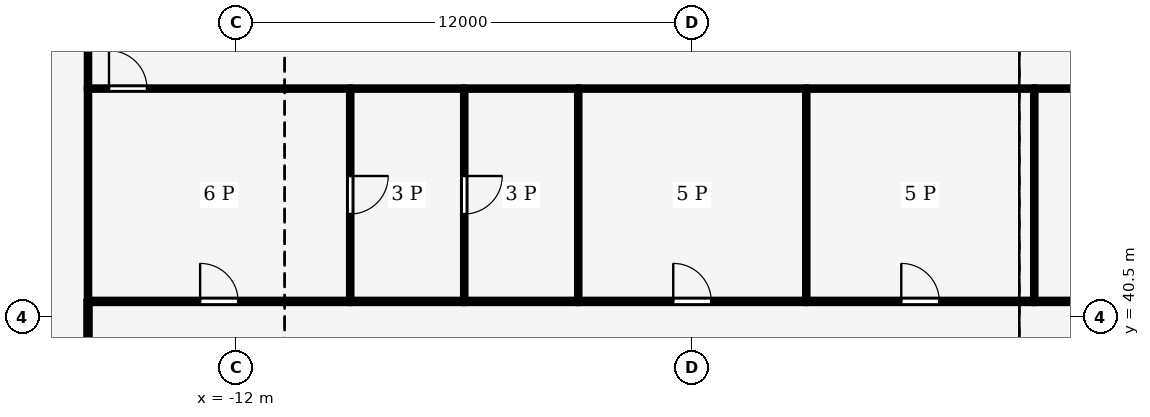
"""IFC4 building model, lengths in metres.
Left out: names, types, materials, properties, quantities, classifications, styles, units other than length and angle.
Written with IfcOpenShell. Run it as: python <this file> out.ifc"""

import sys

from ifc_helpers import new_model, si_unit, direction, frame, frame_2d, origin, place, context, subcontext, project, spatial, rectangle, extrude, element, fill, save


model = new_model("IFC4")
c1 = context("Model", 3, precision=1e-05, world=origin(), true_north=direction((0.0, 1.0)))
c2 = subcontext(c1, "Body", "Model", "MODEL_VIEW")
j1 = project(units=[si_unit("LENGTHUNIT", "METRE"), si_unit("PLANEANGLEUNIT", "RADIAN")], contexts=[c1])
p1 = place(None, origin())
s1 = spatial("IfcSite", under=j1, at=p1, CompositionType="ELEMENT")
p2 = place(p1, origin())
s2 = spatial("IfcBuilding", under=s1, at=p2, CompositionType="ELEMENT")
p3 = place(p2, frame((0.0, 0.0, 202.0)))
s3 = spatial("IfcBuildingStorey", under=s2, at=p3, CompositionType="ELEMENT", Elevation=202.0)
p4 = place(p3, frame((-15.9, 40.9, 0.0), z_axis=(0.0, 0.0, 1.0), x_axis=(1.0, 0.0, 0.0)))
e1 = element("IfcWall", 1, at=p4, inside=s3, PredefinedType="PARTITIONING", context=c2, shape_type="SweptSolid", body=[
    extrude(rectangle(XDim=6.9, YDim=0.125, at=frame_2d((3.45, 0.0))), origin(), (0.0, 0.0, 1.0), 3.44),
])
p5 = place(p4, frame((2.95, 0.0, 0.0)))
e2 = element("IfcOpeningElement", 2, at=p5, cuts=e1, PredefinedType="OPENING", context=c2, shape_type="SweptSolid", body=[
    extrude(rectangle(XDim=1.0, YDim=2.1, at=frame_2d((0.5, 1.05))), frame((0.0, 0.073, 0.0), z_axis=(0.0, -1.0, 0.0), x_axis=(1.0, 0.0, 0.0)), (0.0, 0.0, 1.0), 0.145),
])
for number, where, z_axis, x_axis in (
    (3, (-6.0, 40.9, 0.0), (0.0, 0.0, 1.0), (-1.0, 0.0, 0.0)),
    (4, (-3.0, 40.9, 0.0), (0.0, 0.0, 1.0), (-1.0, 0.0, 0.0)),
):
    element("IfcWall", number, at=place(p3, frame(where, z_axis=z_axis, x_axis=x_axis)), inside=s3, PredefinedType="PARTITIONING", context=c2, shape_type="SweptSolid", body=[
        extrude(rectangle(XDim=3.0, YDim=0.125, at=frame_2d((1.5, 0.0))), origin(), (0.0, 0.0, 1.0), 3.44),
    ])
p6 = place(p3, frame((-3.0, 40.9, 0.0), z_axis=(0.0, 0.0, 1.0), x_axis=(1.0, 0.0, 0.0)))
e5 = element("IfcWall", 5, at=p6, inside=s3, PredefinedType="PARTITIONING", context=c2, shape_type="SweptSolid", body=[
    extrude(rectangle(XDim=6.0, YDim=0.125, at=frame_2d((3.0, 0.0))), origin(), (0.0, 0.0, 1.0), 3.44),
])
p7 = place(p6, frame((2.5, 0.0, 0.0)))
e6 = element("IfcOpeningElement", 6, at=p7, cuts=e5, PredefinedType="OPENING", context=c2, shape_type="SweptSolid", body=[
    extrude(rectangle(XDim=1.0, YDim=2.1, at=frame_2d((0.5, 1.05))), frame((0.0, 0.073, 0.0), z_axis=(0.0, -1.0, 0.0), x_axis=(1.0, 0.0, 0.0)), (0.0, 0.0, 1.0), 0.145),
])
p8 = place(p3, frame((3.0, 40.9, 0.0), z_axis=(0.0, 0.0, 1.0), x_axis=(1.0, 0.0, 0.0)))
e7 = element("IfcWall", 7, at=p8, inside=s3, PredefinedType="PARTITIONING", context=c2, shape_type="SweptSolid", body=[
    extrude(rectangle(XDim=6.0, YDim=0.125, at=frame_2d((3.0, 0.0))), origin(), (0.0, 0.0, 1.0), 3.44),
])
p9 = place(p8, frame((2.5, 0.0, 0.0)))
e8 = element("IfcOpeningElement", 8, at=p9, cuts=e7, PredefinedType="OPENING", context=c2, shape_type="SweptSolid", body=[
    extrude(rectangle(XDim=1.0, YDim=2.1, at=frame_2d((0.5, 1.05))), frame((0.0, 0.073, 0.0), z_axis=(0.0, -1.0, 0.0), x_axis=(1.0, 0.0, 0.0)), (0.0, 0.0, 1.0), 0.145),
])
p10 = place(p3, frame((9.0, 40.9, 0.0), z_axis=(0.0, 0.0, 1.0), x_axis=(1.0, 0.0, 0.0)))
e9 = element("IfcWall", 9, at=p10, inside=s3, PredefinedType="PARTITIONING", context=c2, shape_type="SweptSolid", body=[
    extrude(rectangle(XDim=6.9, YDim=0.125, at=frame_2d((3.45, 0.0))), origin(), (0.0, 0.0, 1.0), 3.44),
])
p11 = place(p10, frame((2.95, 0.0, 0.0)))
e10 = element("IfcOpeningElement", 10, at=p11, cuts=e9, PredefinedType="OPENING", context=c2, shape_type="SweptSolid", body=[
    extrude(rectangle(XDim=1.0, YDim=2.1, at=frame_2d((0.5, 1.05))), frame((0.0, 0.073, 0.0), z_axis=(0.0, -1.0, 0.0), x_axis=(1.0, 0.0, 0.0)), (0.0, 0.0, 1.0), 0.145),
])
p12 = place(p3, frame((-15.9, 34.5, 0.0), z_axis=(0.0, 0.0, 1.0), x_axis=(0.0, 1.0, 0.0)))
e11 = element("IfcWall", 11, at=p12, inside=s3, PredefinedType="PARTITIONING", context=c2, shape_type="SweptSolid", body=[
    extrude(rectangle(XDim=6.404, YDim=0.125, at=frame_2d((3.202, 0.0))), origin(), (0.0, 0.0, 1.0), 3.14),
])
p13 = place(p12, frame((2.702, 0.0, 0.0)))
e12 = element("IfcOpeningElement", 12, at=p13, cuts=e11, PredefinedType="OPENING", context=c2, shape_type="SweptSolid", body=[
    extrude(rectangle(XDim=1.0, YDim=2.1, at=frame_2d((0.5, 1.05))), frame((0.0, 0.073, 0.0), z_axis=(0.0, -1.0, 0.0), x_axis=(1.0, 0.0, 0.0)), (0.0, 0.0, 1.0), 0.145),
])
p14 = place(p3, frame((-9.0, 46.5, 0.0), z_axis=(0.0, 0.0, 1.0), x_axis=(0.0, -1.0, 0.0)))
e13 = element("IfcWall", 13, at=p14, inside=s3, PredefinedType="PARTITIONING", context=c2, shape_type="SweptSolid", body=[
    extrude(rectangle(XDim=5.6, YDim=0.1, at=frame_2d((2.8, 0.0))), origin(), (0.0, 0.0, 1.0), 3.87),
])
p15 = place(p14, frame((2.3, 0.0, 0.0)))
e14 = element("IfcOpeningElement", 14, at=p15, cuts=e13, PredefinedType="OPENING", context=c2, shape_type="SweptSolid", body=[
    extrude(rectangle(XDim=1.0, YDim=2.1, at=frame_2d((0.5, 1.05))), frame((0.0, 0.06, 0.0), z_axis=(0.0, -1.0, 0.0), x_axis=(1.0, 0.0, 0.0)), (0.0, 0.0, 1.0), 0.12),
])
p16 = place(p3, frame((-15.9, 46.5, 0.0), z_axis=(0.0, 0.0, 1.0), x_axis=(1.0, 0.0, 0.0)))
e15 = element("IfcWall", 15, at=p16, inside=s3, PredefinedType="PARTITIONING", context=c2, shape_type="SweptSolid", body=[
    extrude(rectangle(XDim=6.904, YDim=0.1, at=frame_2d((3.452, 0.0))), origin(), (0.0, 0.0, 1.0), 3.44),
])
p17 = place(p16, frame((0.552, 0.0, 0.0)))
e16 = element("IfcOpeningElement", 16, at=p17, cuts=e15, PredefinedType="OPENING", context=c2, shape_type="SweptSolid", body=[
    extrude(rectangle(XDim=1.0, YDim=2.1, at=frame_2d((0.5, 1.05))), frame((0.0, 0.06, 0.0), z_axis=(0.0, -1.0, 0.0), x_axis=(1.0, 0.0, 0.0)), (0.0, 0.0, 1.0), 0.12),
])
p18 = place(p3, frame((-15.9, 46.504, 0.0), z_axis=(0.0, 0.0, 1.0), x_axis=(0.0, -1.0, 0.0)))
e17 = element("IfcWall", 17, at=p18, inside=s3, PredefinedType="PARTITIONING", context=c2, shape_type="SweptSolid", body=[
    extrude(rectangle(XDim=5.608, YDim=0.1, at=frame_2d((2.804, 0.0))), origin(), (0.0, 0.0, 1.0), 3.44),
])
p19 = place(p3, frame((-6.0, 46.5, 0.0), z_axis=(0.0, 0.0, 1.0), x_axis=(0.0, -1.0, 0.0)))
e18 = element("IfcWall", 18, at=p19, inside=s3, PredefinedType="PARTITIONING", context=c2, shape_type="SweptSolid", body=[
    extrude(rectangle(XDim=5.6, YDim=0.1, at=frame_2d((2.8, 0.0))), origin(), (0.0, 0.0, 1.0), 3.87),
])
p20 = place(p19, frame((2.3, 0.0, 0.0)))
e19 = element("IfcOpeningElement", 19, at=p20, cuts=e18, PredefinedType="OPENING", context=c2, shape_type="SweptSolid", body=[
    extrude(rectangle(XDim=1.0, YDim=2.1, at=frame_2d((0.5, 1.05))), frame((0.0, 0.06, 0.0), z_axis=(0.0, -1.0, 0.0), x_axis=(1.0, 0.0, 0.0)), (0.0, 0.0, 1.0), 0.12),
])
p21 = place(p3, frame((-5.996, 46.5, 0.0), z_axis=(0.0, 0.0, 1.0), x_axis=(-1.0, 0.0, 0.0)))
e20 = element("IfcWall", 20, at=p21, inside=s3, PredefinedType="PARTITIONING", context=c2, shape_type="SweptSolid", body=[
    extrude(rectangle(XDim=3.008, YDim=0.1, at=frame_2d((1.504, 0.0))), origin(), (0.0, 0.0, 1.0), 3.44),
])
p22 = place(p3, frame((-3.0, 40.9, 0.0), z_axis=(0.0, 0.0, 1.0), x_axis=(0.0, 1.0, 0.0)))
e21 = element("IfcWall", 21, at=p22, inside=s3, PredefinedType="PARTITIONING", context=c2, shape_type="SweptSolid", body=[
    extrude(rectangle(XDim=5.6, YDim=0.1, at=frame_2d((2.8, 0.0))), origin(), (0.0, 0.0, 1.0), 3.87),
])
p23 = place(p3, frame((-2.996, 46.5, 0.0), z_axis=(0.0, 0.0, 1.0), x_axis=(-1.0, 0.0, 0.0)))
e22 = element("IfcWall", 22, at=p23, inside=s3, PredefinedType="PARTITIONING", context=c2, shape_type="SweptSolid", body=[
    extrude(rectangle(XDim=3.008, YDim=0.1, at=frame_2d((1.504, 0.0))), origin(), (0.0, 0.0, 1.0), 3.44),
])
p24 = place(p3, frame((3.0, 40.9, 0.0), z_axis=(0.0, 0.0, 1.0), x_axis=(0.0, 1.0, 0.0)))
e23 = element("IfcWall", 23, at=p24, inside=s3, PredefinedType="PARTITIONING", context=c2, shape_type="SweptSolid", body=[
    extrude(rectangle(XDim=5.6, YDim=0.1, at=frame_2d((2.8, 0.0))), origin(), (0.0, 0.0, 1.0), 3.87),
])
p25 = place(p3, frame((3.004, 46.5, 0.0), z_axis=(0.0, 0.0, 1.0), x_axis=(-1.0, 0.0, 0.0)))
e24 = element("IfcWall", 24, at=p25, inside=s3, PredefinedType="PARTITIONING", context=c2, shape_type="SweptSolid", body=[
    extrude(rectangle(XDim=6.008, YDim=0.1, at=frame_2d((3.004, 0.0))), origin(), (0.0, 0.0, 1.0), 3.44),
])
p26 = place(p3, frame((9.0, 40.9, 0.0), z_axis=(0.0, 0.0, 1.0), x_axis=(0.0, 1.0, 0.0)))
e25 = element("IfcWall", 25, at=p26, inside=s3, PredefinedType="PARTITIONING", context=c2, shape_type="SweptSolid", body=[
    extrude(rectangle(XDim=5.6, YDim=0.1, at=frame_2d((2.8, 0.0))), origin(), (0.0, 0.0, 1.0), 3.87),
])
p27 = place(p3, frame((9.004, 46.5, 0.0), z_axis=(0.0, 0.0, 1.0), x_axis=(-1.0, 0.0, 0.0)))
e26 = element("IfcWall", 26, at=p27, inside=s3, PredefinedType="PARTITIONING", context=c2, shape_type="SweptSolid", body=[
    extrude(rectangle(XDim=6.008, YDim=0.1, at=frame_2d((3.004, 0.0))), origin(), (0.0, 0.0, 1.0), 3.44),
])
p28 = place(p3, frame((15.9, 46.5, 0.0), z_axis=(0.0, 0.0, 1.0), x_axis=(-1.0, 0.0, 0.0)))
e27 = element("IfcWall", 27, at=p28, inside=s3, PredefinedType="PARTITIONING", context=c2, shape_type="SweptSolid", body=[
    extrude(rectangle(XDim=6.904, YDim=0.1, at=frame_2d((3.452, 0.0))), origin(), (0.0, 0.0, 1.0), 3.44),
])
p29 = place(p3, frame((-15.9, 61.504, 0.0), z_axis=(0.0, 0.0, 1.0), x_axis=(0.0, -1.0, 0.0)))
e28 = element("IfcWall", 28, at=p29, inside=s3, PredefinedType="PARTITIONING", context=c2, shape_type="SweptSolid", body=[
    extrude(rectangle(XDim=15.008, YDim=0.1, at=frame_2d((7.504, 0.0))), origin(), (0.0, 0.0, 1.0), 3.24),
])
p30 = place(p5, origin())
e29 = element("IfcDoor", 29, at=p30, inside=s3, OperationType="SINGLE_SWING_LEFT", PredefinedType="DOOR", context=c2, shape_type="SweptSolid", body=[
    extrude(rectangle(XDim=1.0, YDim=2.1, at=frame_2d((0.5, 1.05))), frame((0.0, 0.025, 0.0), z_axis=(0.0, -1.0, 0.0), x_axis=(1.0, 0.0, 0.0)), (0.0, 0.0, 1.0), 0.05),
])
fill(e2, e29)
p31 = place(p7, origin())
e30 = element("IfcDoor", 30, at=p31, inside=s3, OperationType="SINGLE_SWING_RIGHT", PredefinedType="DOOR", context=c2, shape_type="SweptSolid", body=[
    extrude(rectangle(XDim=1.0, YDim=2.1, at=frame_2d((0.5, 1.05))), frame((0.0, 0.025, 0.0), z_axis=(0.0, -1.0, 0.0), x_axis=(1.0, 0.0, 0.0)), (0.0, 0.0, 1.0), 0.05),
])
fill(e6, e30)
p32 = place(p9, origin())
e31 = element("IfcDoor", 31, at=p32, inside=s3, OperationType="SINGLE_SWING_LEFT", PredefinedType="DOOR", context=c2, shape_type="SweptSolid", body=[
    extrude(rectangle(XDim=1.0, YDim=2.1, at=frame_2d((0.5, 1.05))), frame((0.0, 0.025, 0.0), z_axis=(0.0, -1.0, 0.0), x_axis=(1.0, 0.0, 0.0)), (0.0, 0.0, 1.0), 0.05),
])
fill(e8, e31)
p33 = place(p15, origin())
e32 = element("IfcDoor", 32, at=p33, inside=s3, OperationType="SINGLE_SWING_RIGHT", PredefinedType="DOOR", context=c2, shape_type="SweptSolid", body=[
    extrude(rectangle(XDim=1.0, YDim=2.1, at=frame_2d((0.5, 1.05))), frame((0.0, 0.025, 0.0), z_axis=(0.0, -1.0, 0.0), x_axis=(1.0, 0.0, 0.0)), (0.0, 0.0, 1.0), 0.05),
])
fill(e14, e32)
p34 = place(p17, origin())
e33 = element("IfcDoor", 33, at=p34, inside=s3, OperationType="SINGLE_SWING_LEFT", PredefinedType="DOOR", context=c2, shape_type="SweptSolid", body=[
    extrude(rectangle(XDim=1.0, YDim=2.1, at=frame_2d((0.5, 1.05))), frame((0.0, 0.025, 0.0), z_axis=(0.0, -1.0, 0.0), x_axis=(1.0, 0.0, 0.0)), (0.0, 0.0, 1.0), 0.05),
])
fill(e16, e33)
p35 = place(p20, origin())
e34 = element("IfcDoor", 34, at=p35, inside=s3, OperationType="SINGLE_SWING_RIGHT", PredefinedType="DOOR", context=c2, shape_type="SweptSolid", body=[
    extrude(rectangle(XDim=1.0, YDim=2.1, at=frame_2d((0.5, 1.05))), frame((0.0, 0.025, 0.0), z_axis=(0.0, -1.0, 0.0), x_axis=(1.0, 0.0, 0.0)), (0.0, 0.0, 1.0), 0.05),
])
fill(e19, e34)
save(model, sys.argv[1])
